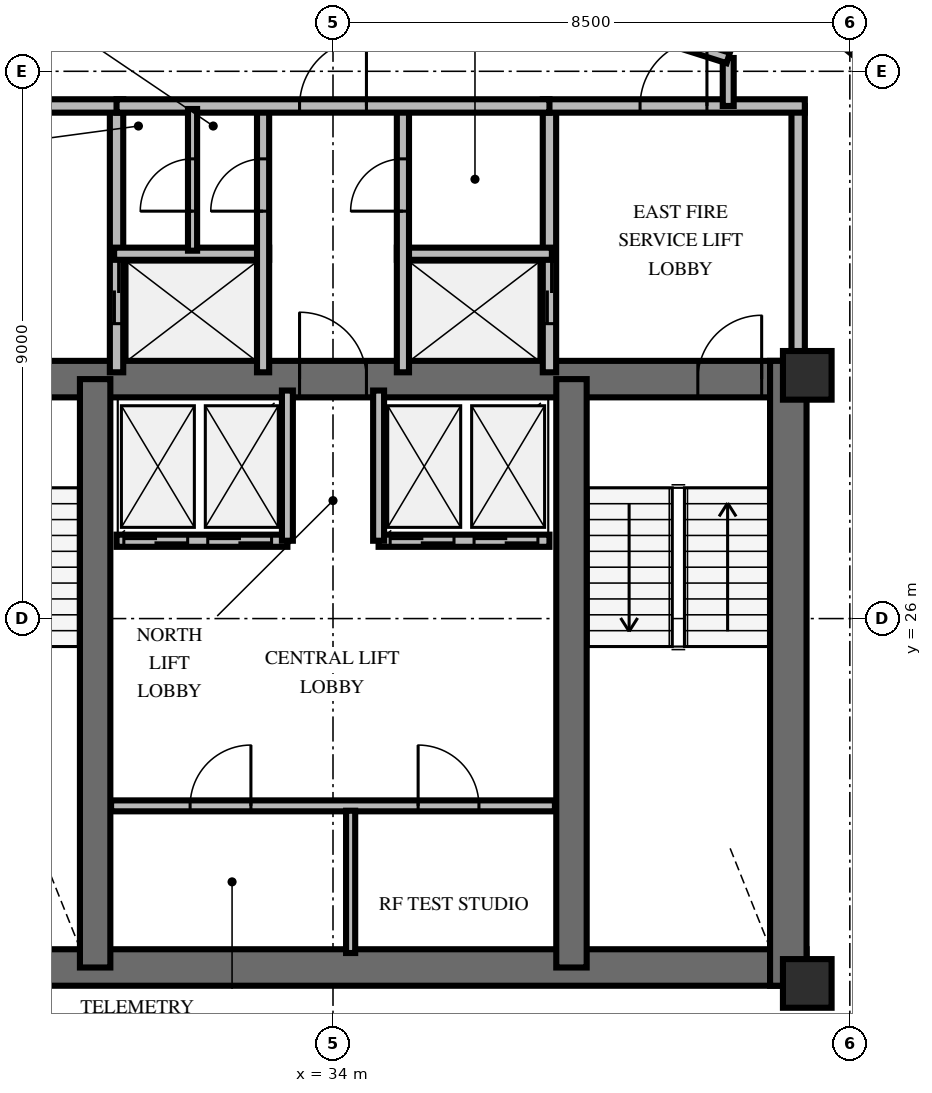
"""IFC4 building model, lengths in metres.
Left out: names, types, materials, properties, quantities, classifications, styles, units other than length and angle.
Written with IfcOpenShell. Run it as: python <this file> out.ifc"""

import sys

from ifc_helpers import new_model, si_unit, direction, frame, frame_2d, origin, origin_2d, place, context, subcontext, project, spatial, rectangle, extrude, element, fill, save


model = new_model("IFC4")
c1 = context("Model", 3, precision=1e-05, world=origin(), true_north=direction((0.0, 1.0)))
c2 = subcontext(c1, "Body", "Model", "MODEL_VIEW")
j1 = project(units=[si_unit("LENGTHUNIT", "METRE"), si_unit("PLANEANGLEUNIT", "RADIAN")], contexts=[c1])
p1 = place(None, origin())
s1 = spatial("IfcSite", under=j1, at=p1, CompositionType="ELEMENT")
p2 = place(p1, origin())
s2 = spatial("IfcBuilding", under=s1, at=p2, CompositionType="ELEMENT")
p3 = place(p2, frame((0.0, 0.0, 280.8)))
s3 = spatial("IfcBuildingStorey", under=s2, at=p3, CompositionType="ELEMENT", Elevation=280.8)
p4 = place(p3, frame((26.222, 20.262, 0.0), z_axis=(0.0, 0.0, 1.0), x_axis=(1.0, 0.0, 0.0)))
e1 = element("IfcWall", 1, at=p4, inside=s3, PredefinedType="SHEAR", context=c2, shape_type="SweptSolid", body=[
    extrude(rectangle(XDim=15.566, YDim=0.6, at=frame_2d((7.783, 0.0))), origin(), (0.0, 0.0, 1.0), 3.6),
])
p5 = place(p3, frame((26.222, 29.938, 0.0), z_axis=(0.0, 0.0, 1.0), x_axis=(1.0, 0.0, 0.0)))
e2 = element("IfcWall", 2, at=p5, inside=s3, PredefinedType="SHEAR", context=c2, shape_type="SweptSolid", body=[
    extrude(rectangle(XDim=15.566, YDim=0.6, at=frame_2d((7.783, 0.0))), origin(), (0.0, 0.0, 1.0), 3.6),
])
p6 = place(p5, frame((0.728, 0.0, 0.0)))
e3 = element("IfcOpeningElement", 3, at=p6, cuts=e2, PredefinedType="OPENING", context=c2, shape_type="SweptSolid", body=[
    extrude(rectangle(XDim=1.05, YDim=2.15, at=frame_2d((0.525, 1.075))), frame((0.0, 0.31, 0.0), z_axis=(0.0, -1.0, 0.0), x_axis=(1.0, 0.0, 0.0)), (0.0, 0.0, 1.0), 0.62),
])
p7 = place(p5, frame((13.778, 0.0, 0.0)))
e4 = element("IfcOpeningElement", 4, at=p7, cuts=e2, PredefinedType="OPENING", context=c2, shape_type="SweptSolid", body=[
    extrude(rectangle(XDim=1.05, YDim=2.15, at=frame_2d((0.525, 1.075))), frame((0.0, 0.31, 0.0), z_axis=(0.0, -1.0, 0.0), x_axis=(1.0, 0.0, 0.0)), (0.0, 0.0, 1.0), 0.62),
])
p8 = place(p5, frame((7.228, 0.0, 0.0)))
e5 = element("IfcOpeningElement", 5, at=p8, cuts=e2, PredefinedType="OPENING", context=c2, shape_type="SweptSolid", body=[
    extrude(rectangle(XDim=1.1, YDim=2.15, at=frame_2d((0.55, 1.075))), frame((0.0, 0.31, 0.0), z_axis=(0.0, -1.0, 0.0), x_axis=(1.0, 0.0, 0.0)), (0.0, 0.0, 1.0), 0.62),
])
p9 = place(p3, frame((41.488, 19.962, 0.0), z_axis=(0.0, 0.0, 1.0), x_axis=(0.0, 1.0, 0.0)))
e6 = element("IfcWall", 6, at=p9, inside=s3, PredefinedType="SHEAR", context=c2, shape_type="SweptSolid", body=[
    extrude(rectangle(XDim=10.276, YDim=0.6, at=frame_2d((5.138, 0.0))), origin(), (0.0, 0.0, 1.0), 3.6),
])
for number, where, z_axis, x_axis in (
    (7, (30.088, 20.262, 0.0), (0.0, 0.0, 1.0), (0.0, 1.0, 0.0)),
    (8, (37.922, 20.262, 0.0), (0.0, 0.0, 1.0), (0.0, 1.0, 0.0)),
):
    element("IfcWall", number, at=place(p3, frame(where, z_axis=z_axis, x_axis=x_axis)), inside=s3, PredefinedType="SHEAR", context=c2, shape_type="SweptSolid", body=[
        extrude(rectangle(XDim=9.676, YDim=0.5, at=frame_2d((4.838, 0.0))), origin(), (0.0, 0.0, 1.0), 3.6),
    ])
for number, where, z_axis, x_axis in (
    (9, (41.8, 20.0, 0.0), (0.0, 0.0, 1.0), (1.0, 0.0, 0.0)),
    (10, (41.8, 30.0, 0.0), (0.0, 0.0, 1.0), (1.0, 0.0, 0.0)),
):
    element("IfcColumn", number, at=place(p3, frame(where, z_axis=z_axis, x_axis=x_axis)), inside=s3, PredefinedType="PILASTER", context=c2, shape_type="SweptSolid", body=[
        extrude(rectangle(XDim=0.8, YDim=0.8, at=origin_2d()), origin(), (0.0, 0.0, 1.0), 3.6),
    ])
p10 = place(p3, frame((30.44, 30.05, 0.0), z_axis=(0.0, 0.0, 1.0), x_axis=(0.0, 1.0, 0.0)))
e11 = element("IfcWall", 11, at=p10, inside=s3, PredefinedType="SOLIDWALL", context=c2, shape_type="SweptSolid", body=[
    extrude(rectangle(XDim=4.38, YDim=0.22, at=frame_2d((2.19, 0.0))), origin(), (0.0, 0.0, 1.0), 2.46),
])
p11 = place(p10, frame((0.8, 0.0, 0.0)))
e12 = element("IfcOpeningElement", 12, at=p11, cuts=e11, PredefinedType="OPENING", context=c2, shape_type="SweptSolid", body=[
    extrude(rectangle(XDim=1.05, YDim=2.1, at=frame_2d((0.525, 1.05))), frame((0.0, 0.12, 0.0), z_axis=(0.0, -1.0, 0.0), x_axis=(1.0, 0.0, 0.0)), (0.0, 0.0, 1.0), 0.24),
])
p12 = place(p3, frame((26.24, 34.43, 0.0), z_axis=(0.0, 0.0, 1.0), x_axis=(1.0, 0.0, 0.0)))
e13 = element("IfcWall", 13, at=p12, inside=s3, PredefinedType="SOLIDWALL", context=c2, shape_type="SweptSolid", body=[
    extrude(rectangle(XDim=4.31, YDim=0.22, at=frame_2d((2.155, 0.0))), origin(), (0.0, 0.0, 1.0), 2.46),
])
p13 = place(p12, frame((1.6, 0.0, 0.0)))
e14 = element("IfcOpeningElement", 14, at=p13, cuts=e13, PredefinedType="OPENING", context=c2, shape_type="SweptSolid", body=[
    extrude(rectangle(XDim=1.1, YDim=2.15, at=frame_2d((0.55, 1.075))), frame((0.0, 0.12, 0.0), z_axis=(0.0, -1.0, 0.0), x_axis=(1.0, 0.0, 0.0)), (0.0, 0.0, 1.0), 0.24),
])
p14 = place(p3, frame((30.4, 32.0, 0.0), z_axis=(0.0, 0.0, 1.0), x_axis=(1.0, 0.0, 0.0)))
e15 = element("IfcWall", 15, at=p14, inside=s3, PredefinedType="SOLIDWALL", context=c2, shape_type="SweptSolid", body=[
    extrude(rectangle(XDim=2.55, YDim=0.2, at=frame_2d((1.275, 0.0))), origin(), (0.0, 0.0, 1.0), 2.46),
])
p15 = place(p3, frame((32.85, 30.05, 0.0), z_axis=(0.0, 0.0, 1.0), x_axis=(0.0, 1.0, 0.0)))
e16 = element("IfcWall", 16, at=p15, inside=s3, PredefinedType="SOLIDWALL", context=c2, shape_type="SweptSolid", body=[
    extrude(rectangle(XDim=4.38, YDim=0.2, at=frame_2d((2.19, 0.0))), origin(), (0.0, 0.0, 1.0), 2.46),
])
p16 = place(p15, frame((2.65, 0.0, 0.0)))
e17 = element("IfcOpeningElement", 17, at=p16, cuts=e16, PredefinedType="OPENING", context=c2, shape_type="SweptSolid", body=[
    extrude(rectangle(XDim=0.86, YDim=2.05, at=frame_2d((0.43, 1.025))), frame((0.0, 0.11, 0.0), z_axis=(0.0, -1.0, 0.0), x_axis=(1.0, 0.0, 0.0)), (0.0, 0.0, 1.0), 0.22),
])
p17 = place(p3, frame((37.56, 30.05, 0.0), z_axis=(0.0, 0.0, 1.0), x_axis=(0.0, 1.0, 0.0)))
e18 = element("IfcWall", 18, at=p17, inside=s3, PredefinedType="SOLIDWALL", context=c2, shape_type="SweptSolid", body=[
    extrude(rectangle(XDim=4.38, YDim=0.22, at=frame_2d((2.19, 0.0))), origin(), (0.0, 0.0, 1.0), 2.46),
])
p18 = place(p17, frame((0.8, 0.0, 0.0)))
e19 = element("IfcOpeningElement", 19, at=p18, cuts=e18, PredefinedType="OPENING", context=c2, shape_type="SweptSolid", body=[
    extrude(rectangle(XDim=1.05, YDim=2.1, at=frame_2d((0.525, 1.05))), frame((0.0, 0.12, 0.0), z_axis=(0.0, -1.0, 0.0), x_axis=(1.0, 0.0, 0.0)), (0.0, 0.0, 1.0), 0.24),
])
p19 = place(p3, frame((41.65, 30.05, 0.0), z_axis=(0.0, 0.0, 1.0), x_axis=(0.0, 1.0, 0.0)))
e20 = element("IfcWall", 20, at=p19, inside=s3, PredefinedType="SOLIDWALL", context=c2, shape_type="SweptSolid", body=[
    extrude(rectangle(XDim=4.38, YDim=0.22, at=frame_2d((2.19, 0.0))), origin(), (0.0, 0.0, 1.0), 2.46),
])
p20 = place(p3, frame((37.45, 34.43, 0.0), z_axis=(0.0, 0.0, 1.0), x_axis=(1.0, 0.0, 0.0)))
e21 = element("IfcWall", 21, at=p20, inside=s3, PredefinedType="SOLIDWALL", context=c2, shape_type="SweptSolid", body=[
    extrude(rectangle(XDim=4.31, YDim=0.22, at=frame_2d((2.155, 0.0))), origin(), (0.0, 0.0, 1.0), 2.46),
])
p21 = place(p20, frame((1.6, 0.0, 0.0)))
e22 = element("IfcOpeningElement", 22, at=p21, cuts=e21, PredefinedType="OPENING", context=c2, shape_type="SweptSolid", body=[
    extrude(rectangle(XDim=1.1, YDim=2.15, at=frame_2d((0.55, 1.075))), frame((0.0, 0.12, 0.0), z_axis=(0.0, -1.0, 0.0), x_axis=(1.0, 0.0, 0.0)), (0.0, 0.0, 1.0), 0.24),
])
p22 = place(p3, frame((35.05, 32.0, 0.0), z_axis=(0.0, 0.0, 1.0), x_axis=(1.0, 0.0, 0.0)))
e23 = element("IfcWall", 23, at=p22, inside=s3, PredefinedType="SOLIDWALL", context=c2, shape_type="SweptSolid", body=[
    extrude(rectangle(XDim=2.55, YDim=0.2, at=frame_2d((1.275, 0.0))), origin(), (0.0, 0.0, 1.0), 2.46),
])
p23 = place(p3, frame((35.15, 30.05, 0.0), z_axis=(0.0, 0.0, 1.0), x_axis=(0.0, 1.0, 0.0)))
e24 = element("IfcWall", 24, at=p23, inside=s3, PredefinedType="SOLIDWALL", context=c2, shape_type="SweptSolid", body=[
    extrude(rectangle(XDim=4.38, YDim=0.2, at=frame_2d((2.19, 0.0))), origin(), (0.0, 0.0, 1.0), 2.46),
])
p24 = place(p23, frame((2.65, 0.0, 0.0)))
e25 = element("IfcOpeningElement", 25, at=p24, cuts=e24, PredefinedType="OPENING", context=c2, shape_type="SweptSolid", body=[
    extrude(rectangle(XDim=0.86, YDim=2.05, at=frame_2d((0.43, 1.025))), frame((0.0, 0.11, 0.0), z_axis=(0.0, -1.0, 0.0), x_axis=(1.0, 0.0, 0.0)), (0.0, 0.0, 1.0), 0.22),
])
p25 = place(p3, frame((30.44, 34.43, 0.0), z_axis=(0.0, 0.0, 1.0), x_axis=(1.0, 0.0, 0.0)))
e26 = element("IfcWall", 26, at=p25, inside=s3, PredefinedType="SOLIDWALL", context=c2, shape_type="SweptSolid", body=[
    extrude(rectangle(XDim=7.12, YDim=0.22, at=frame_2d((3.56, 0.0))), origin(), (0.0, 0.0, 1.0), 2.46),
])
p26 = place(p25, frame((3.01, 0.0, 0.0)))
e27 = element("IfcOpeningElement", 27, at=p26, cuts=e26, PredefinedType="OPENING", context=c2, shape_type="SweptSolid", body=[
    extrude(rectangle(XDim=1.1, YDim=2.15, at=frame_2d((0.55, 1.075))), frame((0.0, 0.12, 0.0), z_axis=(0.0, -1.0, 0.0), x_axis=(1.0, 0.0, 0.0)), (0.0, 0.0, 1.0), 0.24),
])
p27 = place(p3, frame((31.69, 32.05, 0.0), z_axis=(0.0, 0.0, 1.0), x_axis=(0.0, 1.0, 0.0)))
e28 = element("IfcWall", 28, at=p27, inside=s3, PredefinedType="PARTITIONING", context=c2, shape_type="SweptSolid", body=[
    extrude(rectangle(XDim=2.33, YDim=0.15, at=frame_2d((1.165, 0.0))), origin(), (0.0, 0.0, 1.0), 2.46),
])
p28 = place(p27, frame((0.65, 0.0, 0.0)))
e29 = element("IfcOpeningElement", 29, at=p28, cuts=e28, PredefinedType="OPENING", context=c2, shape_type="SweptSolid", body=[
    extrude(rectangle(XDim=0.86, YDim=2.05, at=frame_2d((0.43, 1.025))), frame((0.0, 0.085, 0.0), z_axis=(0.0, -1.0, 0.0), x_axis=(1.0, 0.0, 0.0)), (0.0, 0.0, 1.0), 0.17),
])
p29 = place(p3, frame((30.35, 22.92, 0.0), z_axis=(0.0, 0.0, 1.0), x_axis=(1.0, 0.0, 0.0)))
e30 = element("IfcWall", 30, at=p29, inside=s3, PredefinedType="PARTITIONING", context=c2, shape_type="SweptSolid", body=[
    extrude(rectangle(XDim=7.3, YDim=0.18, at=frame_2d((3.65, 0.0))), origin(), (0.0, 0.0, 1.0), 2.46),
])
p30 = place(p29, frame((1.3, 0.0, 0.0)))
e31 = element("IfcOpeningElement", 31, at=p30, cuts=e30, PredefinedType="OPENING", context=c2, shape_type="SweptSolid", body=[
    extrude(rectangle(XDim=1.0, YDim=2.15, at=frame_2d((0.5, 1.075))), frame((0.0, 0.1, 0.0), z_axis=(0.0, -1.0, 0.0), x_axis=(1.0, 0.0, 0.0)), (0.0, 0.0, 1.0), 0.2),
])
p31 = place(p29, frame((5.05, 0.0, 0.0)))
e32 = element("IfcOpeningElement", 32, at=p31, cuts=e30, PredefinedType="OPENING", context=c2, shape_type="SweptSolid", body=[
    extrude(rectangle(XDim=1.0, YDim=2.15, at=frame_2d((0.5, 1.075))), frame((0.0, 0.1, 0.0), z_axis=(0.0, -1.0, 0.0), x_axis=(1.0, 0.0, 0.0)), (0.0, 0.0, 1.0), 0.2),
])
p32 = place(p3, frame((34.29, 20.5, 0.0), z_axis=(0.0, 0.0, 1.0), x_axis=(0.0, 1.0, 0.0)))
e33 = element("IfcWall", 33, at=p32, inside=s3, PredefinedType="PARTITIONING", context=c2, shape_type="SweptSolid", body=[
    extrude(rectangle(XDim=2.34, YDim=0.15, at=frame_2d((1.17, 0.0))), origin(), (0.0, 0.0, 1.0), 2.46),
])
p33 = place(p3, frame((30.44, 27.28, 0.0), z_axis=(0.0, 0.0, 1.0), x_axis=(1.0, 0.0, 0.0)))
e34 = element("IfcWall", 34, at=p33, inside=s3, PredefinedType="SOLIDWALL", context=c2, shape_type="SweptSolid", body=[
    extrude(rectangle(XDim=2.81, YDim=0.2, at=frame_2d((1.405, 0.0))), origin(), (0.0, 0.0, 1.0), 2.46),
])
p34 = place(p33, frame((0.12, 0.0, 0.0)))
e35 = element("IfcOpeningElement", 35, at=p34, cuts=e34, PredefinedType="OPENING", context=c2, shape_type="SweptSolid", body=[
    extrude(rectangle(XDim=1.05, YDim=2.1, at=frame_2d((0.525, 1.05))), frame((0.0, 0.11, 0.0), z_axis=(0.0, -1.0, 0.0), x_axis=(1.0, 0.0, 0.0)), (0.0, 0.0, 1.0), 0.22),
])
p35 = place(p33, frame((1.5, 0.0, 0.0)))
e36 = element("IfcOpeningElement", 36, at=p35, cuts=e34, PredefinedType="OPENING", context=c2, shape_type="SweptSolid", body=[
    extrude(rectangle(XDim=1.05, YDim=2.1, at=frame_2d((0.525, 1.05))), frame((0.0, 0.11, 0.0), z_axis=(0.0, -1.0, 0.0), x_axis=(1.0, 0.0, 0.0)), (0.0, 0.0, 1.0), 0.22),
])
p36 = place(p3, frame((33.25, 27.28, 0.0), z_axis=(0.0, 0.0, 1.0), x_axis=(0.0, 1.0, 0.0)))
e37 = element("IfcWall", 37, at=p36, inside=s3, PredefinedType="SOLIDWALL", context=c2, shape_type="SweptSolid", body=[
    extrude(rectangle(XDim=2.47, YDim=0.18, at=frame_2d((1.235, 0.0))), origin(), (0.0, 0.0, 1.0), 2.46),
])
p37 = place(p3, frame((34.75, 27.28, 0.0), z_axis=(0.0, 0.0, 1.0), x_axis=(1.0, 0.0, 0.0)))
e38 = element("IfcWall", 38, at=p37, inside=s3, PredefinedType="SOLIDWALL", context=c2, shape_type="SweptSolid", body=[
    extrude(rectangle(XDim=2.81, YDim=0.2, at=frame_2d((1.405, 0.0))), origin(), (0.0, 0.0, 1.0), 2.46),
])
p38 = place(p37, frame((0.19, 0.0, 0.0)))
e39 = element("IfcOpeningElement", 39, at=p38, cuts=e38, PredefinedType="OPENING", context=c2, shape_type="SweptSolid", body=[
    extrude(rectangle(XDim=1.05, YDim=2.1, at=frame_2d((0.525, 1.05))), frame((0.0, 0.11, 0.0), z_axis=(0.0, -1.0, 0.0), x_axis=(1.0, 0.0, 0.0)), (0.0, 0.0, 1.0), 0.22),
])
p39 = place(p37, frame((1.57, 0.0, 0.0)))
e40 = element("IfcOpeningElement", 40, at=p39, cuts=e38, PredefinedType="OPENING", context=c2, shape_type="SweptSolid", body=[
    extrude(rectangle(XDim=1.05, YDim=2.1, at=frame_2d((0.525, 1.05))), frame((0.0, 0.11, 0.0), z_axis=(0.0, -1.0, 0.0), x_axis=(1.0, 0.0, 0.0)), (0.0, 0.0, 1.0), 0.22),
])
p40 = place(p3, frame((34.75, 27.28, 0.0), z_axis=(0.0, 0.0, 1.0), x_axis=(0.0, 1.0, 0.0)))
e41 = element("IfcWall", 41, at=p40, inside=s3, PredefinedType="SOLIDWALL", context=c2, shape_type="SweptSolid", body=[
    extrude(rectangle(XDim=2.47, YDim=0.18, at=frame_2d((1.235, 0.0))), origin(), (0.0, 0.0, 1.0), 2.46),
])
p41 = place(p3, frame((40.5, 35.219, 0.0), z_axis=(0.0, 0.0, 1.0), x_axis=(0.0, -1.0, 0.0)))
e42 = element("IfcWall", 42, at=p41, inside=s3, PredefinedType="PARTITIONING", context=c2, shape_type="SweptSolid", body=[
    extrude(rectangle(XDim=0.789, YDim=0.18, at=frame_2d((0.395, 0.0))), origin(), (0.0, 0.0, 1.0), 2.46),
])
p42 = place(p3, frame((27.5, 35.219, 0.0), z_axis=(0.0, 0.0, 1.0), x_axis=(0.953228121756, 0.302251795518, 0.0)))
e43 = element("IfcWall", 43, at=p42, inside=s3, PredefinedType="PARTITIONING", context=c2, shape_type="SweptSolid", body=[
    extrude(rectangle(XDim=6.819, YDim=0.18, at=frame_2d((3.409, 0.0))), origin(), (0.0, 0.0, 1.0), 2.46),
])
p43 = place(p42, frame((2.86, 0.0, 0.0)))
e44 = element("IfcOpeningElement", 44, at=p43, cuts=e43, PredefinedType="OPENING", context=c2, shape_type="SweptSolid", body=[
    extrude(rectangle(XDim=1.1, YDim=2.15, at=frame_2d((0.55, 1.075))), frame((0.0, 0.1, 0.0), z_axis=(0.0, -1.0, 0.0), x_axis=(1.0, 0.0, 0.0)), (0.0, 0.0, 1.0), 0.2),
])
p44 = place(p3, frame((34.0, 37.28, 0.0), z_axis=(0.0, 0.0, 1.0), x_axis=(0.953228121756, -0.302251795518, 0.0)))
e45 = element("IfcWall", 45, at=p44, inside=s3, PredefinedType="PARTITIONING", context=c2, shape_type="SweptSolid", body=[
    extrude(rectangle(XDim=6.819, YDim=0.18, at=frame_2d((3.409, 0.0))), origin(), (0.0, 0.0, 1.0), 2.46),
])
p45 = place(p44, frame((2.86, 0.0, 0.0)))
e46 = element("IfcOpeningElement", 46, at=p45, cuts=e45, PredefinedType="OPENING", context=c2, shape_type="SweptSolid", body=[
    extrude(rectangle(XDim=1.1, YDim=2.15, at=frame_2d((0.55, 1.075))), frame((0.0, 0.1, 0.0), z_axis=(0.0, -1.0, 0.0), x_axis=(1.0, 0.0, 0.0)), (0.0, 0.0, 1.0), 0.2),
])
p46 = place(p3, frame((43.742, 34.409, 0.0), z_axis=(0.0, 0.0, 1.0), x_axis=(-0.774907966297, 0.632074080919, 0.0)))
e47 = element("IfcWall", 47, at=p46, inside=s3, PredefinedType="PARTITIONING", context=c2, shape_type="SweptSolid", body=[
    extrude(rectangle(XDim=4.47, YDim=0.18, at=frame_2d((2.235, 0.0))), origin(), (0.0, 0.0, 1.0), 2.46),
])
p47 = place(p7, origin())
e48 = element("IfcDoor", 48, at=p47, inside=s3, OperationType="SINGLE_SWING_RIGHT", PredefinedType="DOOR", context=c2, shape_type="SweptSolid", body=[
    extrude(rectangle(XDim=1.05, YDim=2.15, at=frame_2d((0.525, 1.075))), frame((0.0, 0.025, 0.0), z_axis=(0.0, -1.0, 0.0), x_axis=(1.0, 0.0, 0.0)), (0.0, 0.0, 1.0), 0.05),
])
fill(e4, e48)
p48 = place(p8, origin())
e49 = element("IfcDoor", 49, at=p48, inside=s3, OperationType="SINGLE_SWING_LEFT", PredefinedType="DOOR", context=c2, shape_type="SweptSolid", body=[
    extrude(rectangle(XDim=1.1, YDim=2.15, at=frame_2d((0.55, 1.075))), frame((0.0, 0.025, 0.0), z_axis=(0.0, -1.0, 0.0), x_axis=(1.0, 0.0, 0.0)), (0.0, 0.0, 1.0), 0.05),
])
fill(e5, e49)
p49 = place(p11, origin())
e50 = element("IfcDoor", 50, at=p49, inside=s3, OperationType="DOUBLE_DOOR_SLIDING", PredefinedType="USERDEFINED", context=c2, shape_type="SweptSolid", body=[
    extrude(rectangle(XDim=1.05, YDim=2.1, at=frame_2d((0.525, 1.05))), frame((0.0, 0.025, 0.0), z_axis=(0.0, -1.0, 0.0), x_axis=(1.0, 0.0, 0.0)), (0.0, 0.0, 1.0), 0.05),
])
fill(e12, e50)
p50 = place(p16, origin())
e51 = element("IfcDoor", 51, at=p50, inside=s3, OperationType="SINGLE_SWING_LEFT", PredefinedType="TRAPDOOR", context=c2, shape_type="SweptSolid", body=[
    extrude(rectangle(XDim=0.86, YDim=2.05, at=frame_2d((0.43, 1.025))), frame((0.0, 0.025, 0.0), z_axis=(0.0, -1.0, 0.0), x_axis=(1.0, 0.0, 0.0)), (0.0, 0.0, 1.0), 0.05),
])
fill(e17, e51)
p51 = place(p21, origin())
e52 = element("IfcDoor", 52, at=p51, inside=s3, OperationType="SINGLE_SWING_RIGHT", PredefinedType="DOOR", context=c2, shape_type="SweptSolid", body=[
    extrude(rectangle(XDim=1.1, YDim=2.15, at=frame_2d((0.55, 1.075))), frame((0.0, 0.025, 0.0), z_axis=(0.0, -1.0, 0.0), x_axis=(1.0, 0.0, 0.0)), (0.0, 0.0, 1.0), 0.05),
])
fill(e22, e52)
p52 = place(p18, origin())
e53 = element("IfcDoor", 53, at=p52, inside=s3, OperationType="DOUBLE_DOOR_SLIDING", PredefinedType="USERDEFINED", context=c2, shape_type="SweptSolid", body=[
    extrude(rectangle(XDim=1.05, YDim=2.1, at=frame_2d((0.525, 1.05))), frame((0.0, 0.025, 0.0), z_axis=(0.0, -1.0, 0.0), x_axis=(1.0, 0.0, 0.0)), (0.0, 0.0, 1.0), 0.05),
])
fill(e19, e53)
p53 = place(p24, origin())
e54 = element("IfcDoor", 54, at=p53, inside=s3, OperationType="SINGLE_SWING_LEFT", PredefinedType="TRAPDOOR", context=c2, shape_type="SweptSolid", body=[
    extrude(rectangle(XDim=0.86, YDim=2.05, at=frame_2d((0.43, 1.025))), frame((0.0, 0.025, 0.0), z_axis=(0.0, -1.0, 0.0), x_axis=(1.0, 0.0, 0.0)), (0.0, 0.0, 1.0), 0.05),
])
fill(e25, e54)
p54 = place(p26, origin())
e55 = element("IfcDoor", 55, at=p54, inside=s3, OperationType="SINGLE_SWING_RIGHT", PredefinedType="DOOR", context=c2, shape_type="SweptSolid", body=[
    extrude(rectangle(XDim=1.1, YDim=2.15, at=frame_2d((0.55, 1.075))), frame((0.0, 0.025, 0.0), z_axis=(0.0, -1.0, 0.0), x_axis=(1.0, 0.0, 0.0)), (0.0, 0.0, 1.0), 0.05),
])
fill(e27, e55)
p55 = place(p28, origin())
e56 = element("IfcDoor", 56, at=p55, inside=s3, OperationType="SINGLE_SWING_LEFT", PredefinedType="TRAPDOOR", context=c2, shape_type="SweptSolid", body=[
    extrude(rectangle(XDim=0.86, YDim=2.05, at=frame_2d((0.43, 1.025))), frame((0.0, 0.025, 0.0), z_axis=(0.0, -1.0, 0.0), x_axis=(1.0, 0.0, 0.0)), (0.0, 0.0, 1.0), 0.05),
])
fill(e29, e56)
p56 = place(p30, origin())
e57 = element("IfcDoor", 57, at=p56, inside=s3, OperationType="SINGLE_SWING_RIGHT", PredefinedType="DOOR", context=c2, shape_type="SweptSolid", body=[
    extrude(rectangle(XDim=1.0, YDim=2.15, at=frame_2d((0.5, 1.075))), frame((0.0, 0.025, 0.0), z_axis=(0.0, -1.0, 0.0), x_axis=(1.0, 0.0, 0.0)), (0.0, 0.0, 1.0), 0.05),
])
fill(e31, e57)
p57 = place(p31, origin())
e58 = element("IfcDoor", 58, at=p57, inside=s3, OperationType="SINGLE_SWING_LEFT", PredefinedType="DOOR", context=c2, shape_type="SweptSolid", body=[
    extrude(rectangle(XDim=1.0, YDim=2.15, at=frame_2d((0.5, 1.075))), frame((0.0, 0.025, 0.0), z_axis=(0.0, -1.0, 0.0), x_axis=(1.0, 0.0, 0.0)), (0.0, 0.0, 1.0), 0.05),
])
fill(e32, e58)
p58 = place(p34, origin())
e59 = element("IfcDoor", 59, at=p58, inside=s3, OperationType="DOUBLE_DOOR_SLIDING", PredefinedType="USERDEFINED", context=c2, shape_type="SweptSolid", body=[
    extrude(rectangle(XDim=1.05, YDim=2.1, at=frame_2d((0.525, 1.05))), frame((0.0, 0.025, 0.0), z_axis=(0.0, -1.0, 0.0), x_axis=(1.0, 0.0, 0.0)), (0.0, 0.0, 1.0), 0.05),
])
fill(e35, e59)
p59 = place(p35, origin())
e60 = element("IfcDoor", 60, at=p59, inside=s3, OperationType="DOUBLE_DOOR_SLIDING", PredefinedType="USERDEFINED", context=c2, shape_type="SweptSolid", body=[
    extrude(rectangle(XDim=1.05, YDim=2.1, at=frame_2d((0.525, 1.05))), frame((0.0, 0.025, 0.0), z_axis=(0.0, -1.0, 0.0), x_axis=(1.0, 0.0, 0.0)), (0.0, 0.0, 1.0), 0.05),
])
fill(e36, e60)
p60 = place(p38, origin())
e61 = element("IfcDoor", 61, at=p60, inside=s3, OperationType="DOUBLE_DOOR_SLIDING", PredefinedType="USERDEFINED", context=c2, shape_type="SweptSolid", body=[
    extrude(rectangle(XDim=1.05, YDim=2.1, at=frame_2d((0.525, 1.05))), frame((0.0, 0.025, 0.0), z_axis=(0.0, -1.0, 0.0), x_axis=(1.0, 0.0, 0.0)), (0.0, 0.0, 1.0), 0.05),
])
fill(e39, e61)
p61 = place(p39, origin())
e62 = element("IfcDoor", 62, at=p61, inside=s3, OperationType="DOUBLE_DOOR_SLIDING", PredefinedType="USERDEFINED", context=c2, shape_type="SweptSolid", body=[
    extrude(rectangle(XDim=1.05, YDim=2.1, at=frame_2d((0.525, 1.05))), frame((0.0, 0.025, 0.0), z_axis=(0.0, -1.0, 0.0), x_axis=(1.0, 0.0, 0.0)), (0.0, 0.0, 1.0), 0.05),
])
fill(e40, e62)
save(model, sys.argv[1])
